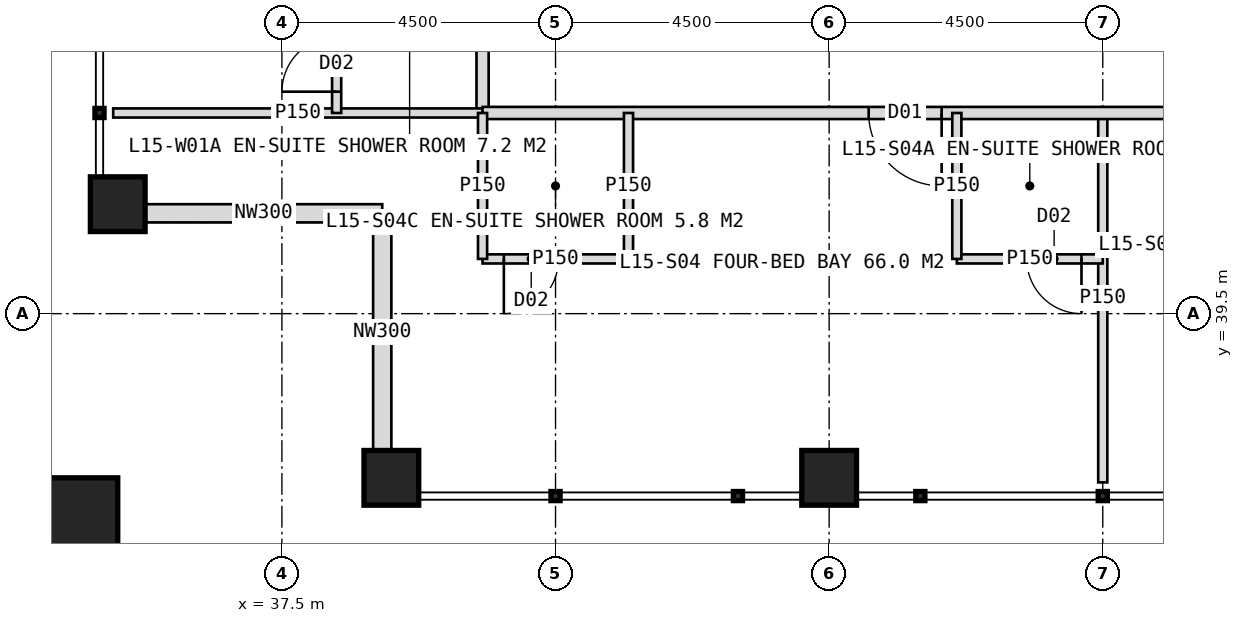
"""IFC4 building model, lengths in metres.
Left out: names, types, materials, properties, quantities, classifications, styles, units other than length and angle.
Written with IfcOpenShell. Run it as: python <this file> out.ifc"""

import sys

from ifc_helpers import new_model, si_unit, direction, frame, frame_2d, origin, origin_2d, place, context, subcontext, project, spatial, rectangle, hollow_rectangle, extrude, element, fill, save


model = new_model("IFC4")
c1 = context("Model", 3, precision=1e-05, world=origin(), true_north=direction((0.0, 1.0)))
c2 = subcontext(c1, "Body", "Model", "MODEL_VIEW")
j1 = project(units=[si_unit("LENGTHUNIT", "METRE"), si_unit("PLANEANGLEUNIT", "RADIAN")], contexts=[c1])
p1 = place(None, origin())
s1 = spatial("IfcSite", under=j1, at=p1, CompositionType="ELEMENT")
p2 = place(p1, origin())
s2 = spatial("IfcBuilding", under=s1, at=p2, CompositionType="ELEMENT")
p3 = place(p2, frame((0.0, 0.0, 67.0)))
s3 = spatial("IfcBuildingStorey", under=s2, at=p3, CompositionType="ELEMENT", Elevation=67.0)
for number, where, z_axis, x_axis in (
    (1, (39.3, 36.8, 0.0), (0.0, 0.0, 1.0), (1.0, 0.0, 0.0)),
    (2, (34.8, 41.3, 0.0), (0.0, 0.0, 1.0), (1.0, 0.0, 0.0)),
    (3, (46.5, 36.8, 0.0), (0.0, 0.0, 1.0), (1.0, 0.0, 0.0)),
):
    element("IfcColumn", number, at=place(p3, frame(where, z_axis=z_axis, x_axis=x_axis)), inside=s3, PredefinedType="COLUMN", context=c2, shape_type="SweptSolid", body=[
        extrude(hollow_rectangle(XDim=0.9, YDim=0.9, WallThickness=0.08, at=origin_2d()), origin(), (0.0, 0.0, 1.0), 4.0),
    ])
p4 = place(p3, frame((33.9, 35.9, 0.0), z_axis=(0.0, 0.0, 1.0), x_axis=(1.0, 0.0, 0.0)))
e4 = element("IfcColumn", 4, at=p4, inside=s3, PredefinedType="COLUMN", context=c2, shape_type="SweptSolid", body=[
    extrude(hollow_rectangle(XDim=1.8, YDim=1.8, WallThickness=0.1, at=origin_2d()), origin(), (0.0, 0.0, 1.0), 4.0),
])
for number, where, z_axis, x_axis in (
    (5, (39.15, 37.25, 0.0), (0.0, 0.0, 1.0), (0.0, 1.0, 0.0)),
    (6, (39.15, 41.15, 0.0), (0.0, 0.0, 1.0), (-1.0, 0.0, 0.0)),
):
    element("IfcWall", number, at=place(p3, frame(where, z_axis=z_axis, x_axis=x_axis)), inside=s3, PredefinedType="ELEMENTEDWALL", context=c2, shape_type="SweptSolid", body=[
        extrude(rectangle(XDim=3.9, YDim=0.3, at=frame_2d((1.95, 0.0))), origin(), (0.0, 0.0, 1.0), 2.95),
    ])
p5 = place(p3, frame((40.8, 42.8, 0.0), z_axis=(0.0, 0.0, 1.0), x_axis=(0.0, 1.0, 0.0)))
e7 = element("IfcWall", 7, at=p5, inside=s3, PredefinedType="PARTITIONING", context=c2, shape_type="SweptSolid", body=[
    extrude(rectangle(XDim=38.4, YDim=0.2, at=frame_2d((19.2, 0.0))), origin(), (0.0, 0.0, 1.0), 3.75),
])
p6 = place(p5, frame((3.25, 0.0, 0.0)))
e8 = element("IfcOpeningElement", 8, at=p6, cuts=e7, PredefinedType="OPENING", context=c2, shape_type="SweptSolid", body=[
    extrude(rectangle(XDim=1.2, YDim=2.2, at=frame_2d((0.6, 1.1))), frame((0.0, 0.11, 0.0), z_axis=(0.0, -1.0, 0.0), x_axis=(1.0, 0.0, 0.0)), (0.0, 0.0, 1.0), 0.22),
])
p7 = place(p5, frame((9.85, 0.0, 0.0)))
e9 = element("IfcOpeningElement", 9, at=p7, cuts=e7, PredefinedType="OPENING", context=c2, shape_type="SweptSolid", body=[
    extrude(rectangle(XDim=1.2, YDim=2.2, at=frame_2d((0.6, 1.1))), frame((0.0, 0.11, 0.0), z_axis=(0.0, -1.0, 0.0), x_axis=(1.0, 0.0, 0.0)), (0.0, 0.0, 1.0), 0.22),
])
p8 = place(p5, frame((15.85, 0.0, 0.0)))
e10 = element("IfcOpeningElement", 10, at=p8, cuts=e7, PredefinedType="OPENING", context=c2, shape_type="SweptSolid", body=[
    extrude(rectangle(XDim=1.2, YDim=2.2, at=frame_2d((0.6, 1.1))), frame((0.0, 0.11, 0.0), z_axis=(0.0, -1.0, 0.0), x_axis=(1.0, 0.0, 0.0)), (0.0, 0.0, 1.0), 0.22),
])
p9 = place(p5, frame((22.45, 0.0, 0.0)))
e11 = element("IfcOpeningElement", 11, at=p9, cuts=e7, PredefinedType="OPENING", context=c2, shape_type="SweptSolid", body=[
    extrude(rectangle(XDim=1.2, YDim=2.2, at=frame_2d((0.6, 1.1))), frame((0.0, 0.11, 0.0), z_axis=(0.0, -1.0, 0.0), x_axis=(1.0, 0.0, 0.0)), (0.0, 0.0, 1.0), 0.22),
])
p10 = place(p5, frame((30.85, 0.0, 0.0)))
e12 = element("IfcOpeningElement", 12, at=p10, cuts=e7, PredefinedType="OPENING", context=c2, shape_type="SweptSolid", body=[
    extrude(rectangle(XDim=1.2, YDim=2.2, at=frame_2d((0.6, 1.1))), frame((0.0, 0.11, 0.0), z_axis=(0.0, -1.0, 0.0), x_axis=(1.0, 0.0, 0.0)), (0.0, 0.0, 1.0), 0.22),
])
p11 = place(p3, frame((40.8, 42.8, 0.0), z_axis=(0.0, 0.0, 1.0), x_axis=(-1.0, 0.0, 0.0)))
e13 = element("IfcWall", 13, at=p11, inside=s3, PredefinedType="PARTITIONING", context=c2, shape_type="SweptSolid", body=[
    extrude(rectangle(XDim=6.075, YDim=0.15, at=frame_2d((3.038, 0.0))), origin(), (0.0, 0.0, 1.0), 3.75),
])
p12 = place(p3, frame((38.4, 42.8, 0.0), z_axis=(0.0, 0.0, 1.0), x_axis=(0.0, 1.0, 0.0)))
e14 = element("IfcWall", 14, at=p12, inside=s3, PredefinedType="PARTITIONING", context=c2, shape_type="SweptSolid", body=[
    extrude(rectangle(XDim=3.0, YDim=0.15, at=frame_2d((1.5, 0.0))), origin(), (0.0, 0.0, 1.0), 3.75),
])
p13 = place(p12, frame((0.35, 0.0, 0.0)))
e15 = element("IfcOpeningElement", 15, at=p13, cuts=e14, PredefinedType="OPENING", context=c2, shape_type="SweptSolid", body=[
    extrude(rectangle(XDim=0.9, YDim=2.1, at=frame_2d((0.45, 1.05))), frame((0.0, 0.085, 0.0), z_axis=(0.0, -1.0, 0.0), x_axis=(1.0, 0.0, 0.0)), (0.0, 0.0, 1.0), 0.17),
])
p14 = place(p3, frame((51.0, 42.8, 0.0), z_axis=(0.0, 0.0, 1.0), x_axis=(0.0, -1.0, 0.0)))
e16 = element("IfcWall", 16, at=p14, inside=s3, PredefinedType="PARTITIONING", context=c2, shape_type="SweptSolid", body=[
    extrude(rectangle(XDim=6.075, YDim=0.15, at=frame_2d((3.038, 0.0))), origin(), (0.0, 0.0, 1.0), 3.75),
])
p15 = place(p3, frame((79.2, 42.8, 0.0), z_axis=(0.0, 0.0, 1.0), x_axis=(-1.0, 0.0, 0.0)))
e17 = element("IfcWall", 17, at=p15, inside=s3, PredefinedType="PARTITIONING", context=c2, shape_type="SweptSolid", body=[
    extrude(rectangle(XDim=38.4, YDim=0.2, at=frame_2d((19.2, 0.0))), origin(), (0.0, 0.0, 1.0), 3.75),
])
p16 = place(p15, frame((3.25, 0.0, 0.0)))
e18 = element("IfcOpeningElement", 18, at=p16, cuts=e17, PredefinedType="OPENING", context=c2, shape_type="SweptSolid", body=[
    extrude(rectangle(XDim=1.2, YDim=2.2, at=frame_2d((0.6, 1.1))), frame((0.0, 0.11, 0.0), z_axis=(0.0, -1.0, 0.0), x_axis=(1.0, 0.0, 0.0)), (0.0, 0.0, 1.0), 0.22),
])
p17 = place(p15, frame((13.45, 0.0, 0.0)))
e19 = element("IfcOpeningElement", 19, at=p17, cuts=e17, PredefinedType="OPENING", context=c2, shape_type="SweptSolid", body=[
    extrude(rectangle(XDim=1.2, YDim=2.2, at=frame_2d((0.6, 1.1))), frame((0.0, 0.11, 0.0), z_axis=(0.0, -1.0, 0.0), x_axis=(1.0, 0.0, 0.0)), (0.0, 0.0, 1.0), 0.22),
])
p18 = place(p15, frame((22.45, 0.0, 0.0)))
e20 = element("IfcOpeningElement", 20, at=p18, cuts=e17, PredefinedType="OPENING", context=c2, shape_type="SweptSolid", body=[
    extrude(rectangle(XDim=1.2, YDim=2.2, at=frame_2d((0.6, 1.1))), frame((0.0, 0.11, 0.0), z_axis=(0.0, -1.0, 0.0), x_axis=(1.0, 0.0, 0.0)), (0.0, 0.0, 1.0), 0.22),
])
p19 = place(p15, frame((30.85, 0.0, 0.0)))
e21 = element("IfcOpeningElement", 21, at=p19, cuts=e17, PredefinedType="OPENING", context=c2, shape_type="SweptSolid", body=[
    extrude(rectangle(XDim=1.2, YDim=2.2, at=frame_2d((0.6, 1.1))), frame((0.0, 0.11, 0.0), z_axis=(0.0, -1.0, 0.0), x_axis=(1.0, 0.0, 0.0)), (0.0, 0.0, 1.0), 0.22),
])
p20 = place(p3, frame((51.0, 40.4, 0.0), z_axis=(0.0, 0.0, 1.0), x_axis=(-1.0, 0.0, 0.0)))
e22 = element("IfcWall", 22, at=p20, inside=s3, PredefinedType="PARTITIONING", context=c2, shape_type="SweptSolid", body=[
    extrude(rectangle(XDim=2.4, YDim=0.15, at=frame_2d((1.2, 0.0))), origin(), (0.0, 0.0, 1.0), 3.75),
])
p21 = place(p20, frame((0.35, 0.0, 0.0)))
e23 = element("IfcOpeningElement", 23, at=p21, cuts=e22, PredefinedType="OPENING", context=c2, shape_type="SweptSolid", body=[
    extrude(rectangle(XDim=0.9, YDim=2.1, at=frame_2d((0.45, 1.05))), frame((0.0, 0.085, 0.0), z_axis=(0.0, -1.0, 0.0), x_axis=(1.0, 0.0, 0.0)), (0.0, 0.0, 1.0), 0.17),
])
p22 = place(p3, frame((48.6, 42.8, 0.0), z_axis=(0.0, 0.0, 1.0), x_axis=(0.0, -1.0, 0.0)))
e24 = element("IfcWall", 24, at=p22, inside=s3, PredefinedType="PARTITIONING", context=c2, shape_type="SweptSolid", body=[
    extrude(rectangle(XDim=2.4, YDim=0.15, at=frame_2d((1.2, 0.0))), origin(), (0.0, 0.0, 1.0), 3.75),
])
p23 = place(p3, frame((43.2, 40.4, 0.0), z_axis=(0.0, 0.0, 1.0), x_axis=(-1.0, 0.0, 0.0)))
e25 = element("IfcWall", 25, at=p23, inside=s3, PredefinedType="PARTITIONING", context=c2, shape_type="SweptSolid", body=[
    extrude(rectangle(XDim=2.4, YDim=0.15, at=frame_2d((1.2, 0.0))), origin(), (0.0, 0.0, 1.0), 3.75),
])
p24 = place(p23, frame((1.15, 0.0, 0.0)))
e26 = element("IfcOpeningElement", 26, at=p24, cuts=e25, PredefinedType="OPENING", context=c2, shape_type="SweptSolid", body=[
    extrude(rectangle(XDim=0.9, YDim=2.1, at=frame_2d((0.45, 1.05))), frame((0.0, 0.085, 0.0), z_axis=(0.0, -1.0, 0.0), x_axis=(1.0, 0.0, 0.0)), (0.0, 0.0, 1.0), 0.17),
])
for number, where, z_axis, x_axis in (
    (27, (43.2, 42.8, 0.0), (0.0, 0.0, 1.0), (0.0, -1.0, 0.0)),
    (28, (40.8, 42.8, 0.0), (0.0, 0.0, 1.0), (0.0, -1.0, 0.0)),
):
    element("IfcWall", number, at=place(p3, frame(where, z_axis=z_axis, x_axis=x_axis)), inside=s3, PredefinedType="PARTITIONING", context=c2, shape_type="SweptSolid", body=[
        extrude(rectangle(XDim=2.4, YDim=0.15, at=frame_2d((1.2, 0.0))), origin(), (0.0, 0.0, 1.0), 3.75),
    ])
p25 = place(p13, origin())
e29 = element("IfcDoor", 29, at=p25, inside=s3, OperationType="SINGLE_SWING_LEFT", PredefinedType="DOOR", context=c2, shape_type="SweptSolid", body=[
    extrude(rectangle(XDim=0.9, YDim=2.1, at=frame_2d((0.45, 1.05))), frame((0.0, 0.025, 0.0), z_axis=(0.0, -1.0, 0.0), x_axis=(1.0, 0.0, 0.0)), (0.0, 0.0, 1.0), 0.05),
])
fill(e15, e29)
p26 = place(p19, origin())
e30 = element("IfcDoor", 30, at=p26, inside=s3, OperationType="SINGLE_SWING_LEFT", PredefinedType="DOOR", context=c2, shape_type="SweptSolid", body=[
    extrude(rectangle(XDim=1.2, YDim=2.2, at=frame_2d((0.6, 1.1))), frame((0.0, 0.025, 0.0), z_axis=(0.0, -1.0, 0.0), x_axis=(1.0, 0.0, 0.0)), (0.0, 0.0, 1.0), 0.05),
])
fill(e21, e30)
p27 = place(p21, origin())
e31 = element("IfcDoor", 31, at=p27, inside=s3, OperationType="SINGLE_SWING_LEFT", PredefinedType="DOOR", context=c2, shape_type="SweptSolid", body=[
    extrude(rectangle(XDim=0.9, YDim=2.1, at=frame_2d((0.45, 1.05))), frame((0.0, 0.025, 0.0), z_axis=(0.0, -1.0, 0.0), x_axis=(1.0, 0.0, 0.0)), (0.0, 0.0, 1.0), 0.05),
])
fill(e23, e31)
p28 = place(p24, origin())
e32 = element("IfcDoor", 32, at=p28, inside=s3, OperationType="SINGLE_SWING_RIGHT", PredefinedType="DOOR", context=c2, shape_type="SweptSolid", body=[
    extrude(rectangle(XDim=0.9, YDim=2.1, at=frame_2d((0.45, 1.05))), frame((0.0, 0.025, 0.0), z_axis=(0.0, -1.0, 0.0), x_axis=(1.0, 0.0, 0.0)), (0.0, 0.0, 1.0), 0.05),
])
fill(e26, e32)
save(model, sys.argv[1])
